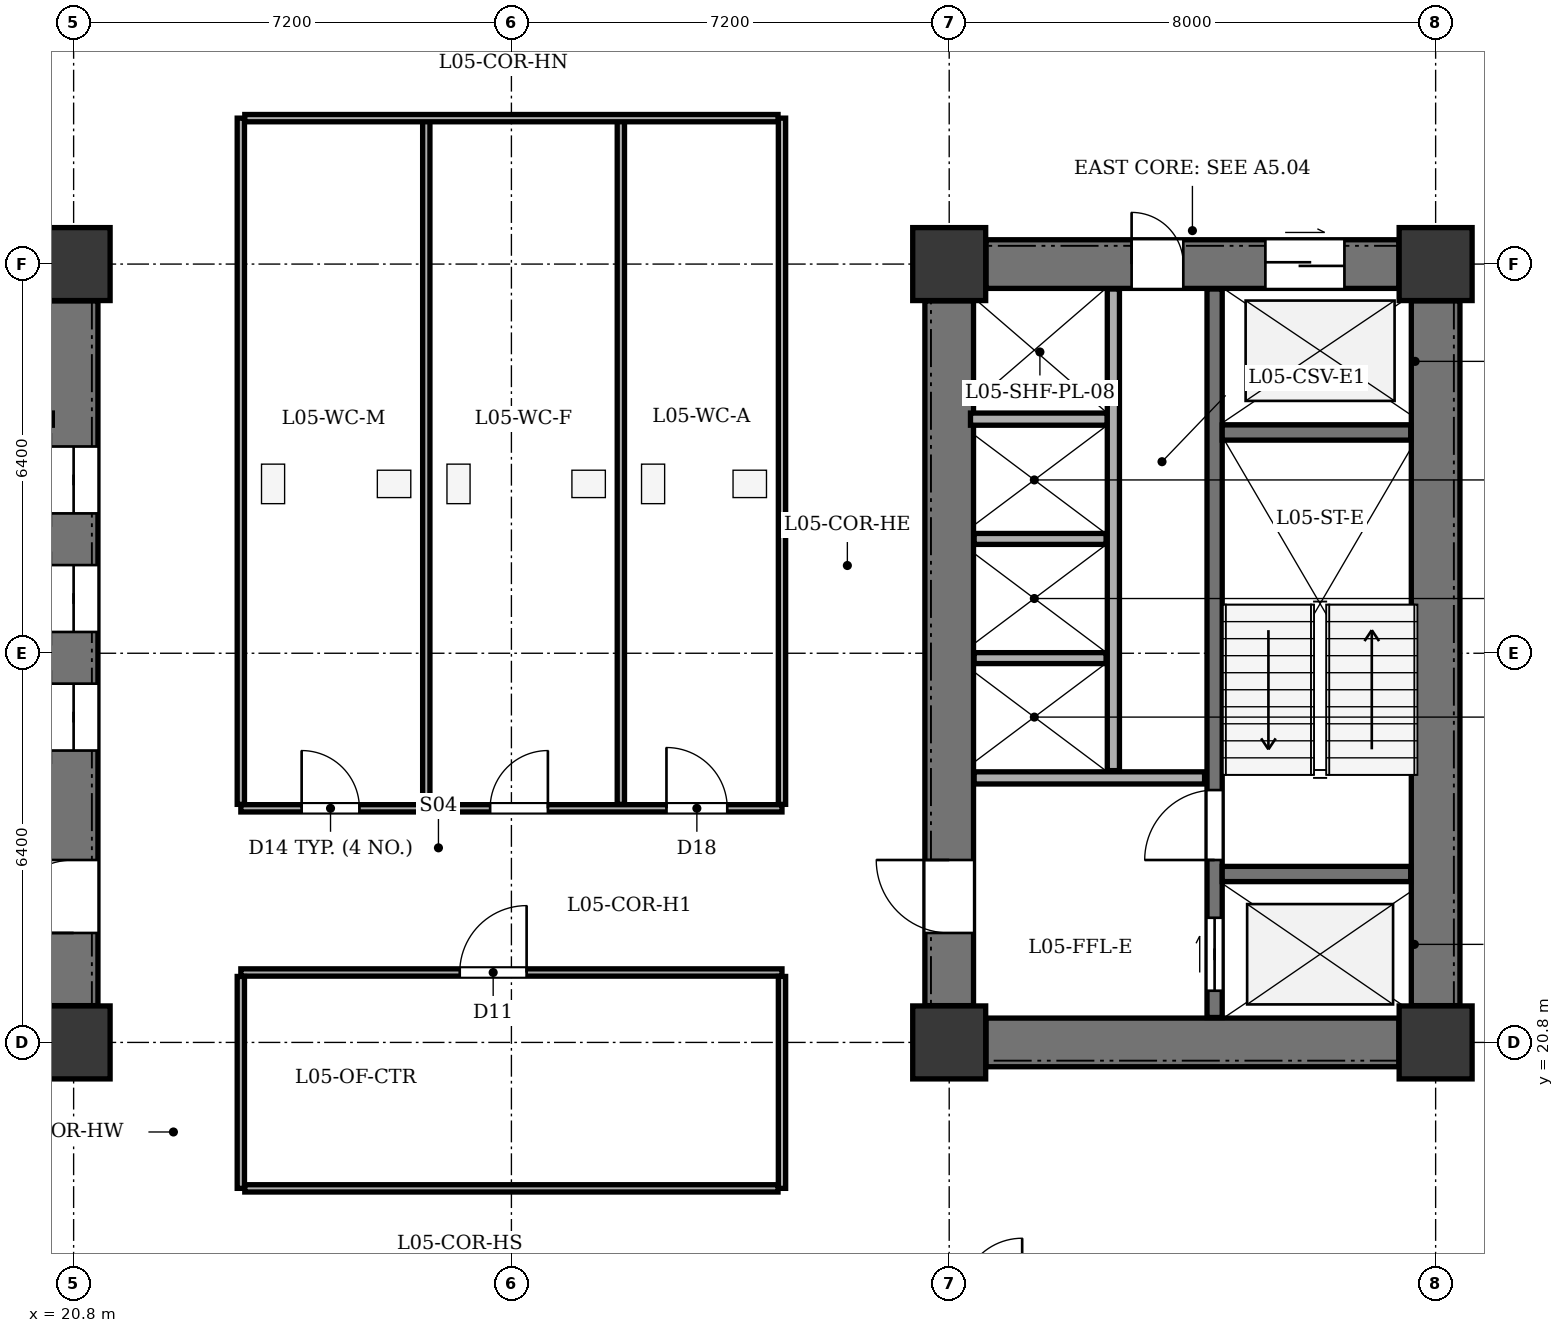
"""IFC4 building model, lengths in metres.
Left out: names, types, materials, properties, quantities, classifications, styles, units other than length and angle.
Written with IfcOpenShell. Run it as: python <this file> out.ifc"""

import sys

from ifc_helpers import new_model, si_unit, direction, frame, frame_2d, origin, origin_2d, place, context, subcontext, project, spatial, rectangle, extrude, element, fill, save


model = new_model("IFC4")
c1 = context("Model", 3, precision=1e-05, world=origin(), true_north=direction((0.0, 1.0)))
c2 = subcontext(c1, "Body", "Model", "MODEL_VIEW")
j1 = project(units=[si_unit("LENGTHUNIT", "METRE"), si_unit("PLANEANGLEUNIT", "RADIAN")], contexts=[c1])
p1 = place(None, origin())
s1 = spatial("IfcSite", under=j1, at=p1, CompositionType="ELEMENT")
p2 = place(p1, origin())
s2 = spatial("IfcBuilding", under=s1, at=p2, CompositionType="ELEMENT")
p3 = place(p2, frame((0.0, 0.0, 24.3)))
s3 = spatial("IfcBuildingStorey", under=s2, at=p3, CompositionType="ELEMENT", Elevation=24.3)
for number, where, z_axis, x_axis in (
    (1, (20.8, 20.8, 0.0), (0.0, 0.0, 1.0), (1.0, 0.0, 0.0)),
    (2, (20.8, 33.6, 0.0), (0.0, 0.0, 1.0), (1.0, 0.0, 0.0)),
    (3, (35.2, 20.8, 0.0), (0.0, 0.0, 1.0), (1.0, 0.0, 0.0)),
    (4, (43.2, 20.8, 0.0), (0.0, 0.0, 1.0), (1.0, 0.0, 0.0)),
    (5, (35.2, 33.6, 0.0), (0.0, 0.0, 1.0), (1.0, 0.0, 0.0)),
    (6, (43.2, 33.6, 0.0), (0.0, 0.0, 1.0), (1.0, 0.0, 0.0)),
):
    element("IfcColumn", number, at=place(p3, frame(where, z_axis=z_axis, x_axis=x_axis)), inside=s3, PredefinedType="COLUMN", context=c2, shape_type="SweptSolid", body=[
        extrude(rectangle(XDim=1.2, YDim=1.2, at=origin_2d()), origin(), (0.0, 0.0, 1.0), 3.9),
    ])
p4 = place(p3, frame((20.8, 21.405, 0.0), z_axis=(0.0, 0.0, 1.0), x_axis=(0.0, 1.0, 0.0)))
e7 = element("IfcWall", 7, at=p4, inside=s3, PredefinedType="SHEAR", context=c2, shape_type="SweptSolid", body=[
    extrude(rectangle(XDim=11.59, YDim=0.8, at=frame_2d((5.795, 0.0))), origin(), (0.0, 0.0, 1.0), 3.6),
])
p5 = place(p4, frame((1.195, 0.0, 0.0)))
e8 = element("IfcOpeningElement", 8, at=p5, cuts=e7, PredefinedType="OPENING", context=c2, shape_type="SweptSolid", body=[
    extrude(rectangle(XDim=1.2, YDim=2.15, at=frame_2d((0.6, 1.075))), frame((0.0, 0.41, 0.0), z_axis=(0.0, -1.0, 0.0), x_axis=(1.0, 0.0, 0.0)), (0.0, 0.0, 1.0), 0.82),
])
p6 = place(p4, frame((4.195, 0.0, 0.0)))
e9 = element("IfcOpeningElement", 9, at=p6, cuts=e7, PredefinedType="OPENING", context=c2, shape_type="SweptSolid", body=[
    extrude(rectangle(XDim=1.1, YDim=2.1, at=frame_2d((0.55, 1.05))), frame((0.0, 0.41, 0.0), z_axis=(0.0, -1.0, 0.0), x_axis=(1.0, 0.0, 0.0)), (0.0, 0.0, 1.0), 0.82),
])
p7 = place(p4, frame((6.145, 0.0, 0.0)))
e10 = element("IfcOpeningElement", 10, at=p7, cuts=e7, PredefinedType="OPENING", context=c2, shape_type="SweptSolid", body=[
    extrude(rectangle(XDim=1.1, YDim=2.1, at=frame_2d((0.55, 1.05))), frame((0.0, 0.41, 0.0), z_axis=(0.0, -1.0, 0.0), x_axis=(1.0, 0.0, 0.0)), (0.0, 0.0, 1.0), 0.82),
])
p8 = place(p4, frame((8.095, 0.0, 0.0)))
e11 = element("IfcOpeningElement", 11, at=p8, cuts=e7, PredefinedType="OPENING", context=c2, shape_type="SweptSolid", body=[
    extrude(rectangle(XDim=1.1, YDim=2.1, at=frame_2d((0.55, 1.05))), frame((0.0, 0.41, 0.0), z_axis=(0.0, -1.0, 0.0), x_axis=(1.0, 0.0, 0.0)), (0.0, 0.0, 1.0), 0.82),
])
p9 = place(p3, frame((43.2, 21.405, 0.0), z_axis=(0.0, 0.0, 1.0), x_axis=(0.0, 1.0, 0.0)))
e12 = element("IfcWall", 12, at=p9, inside=s3, PredefinedType="SHEAR", context=c2, shape_type="SweptSolid", body=[
    extrude(rectangle(XDim=11.59, YDim=0.8, at=frame_2d((5.795, 0.0))), origin(), (0.0, 0.0, 1.0), 3.6),
])
p10 = place(p3, frame((35.805, 20.8, 0.0), z_axis=(0.0, 0.0, 1.0), x_axis=(1.0, 0.0, 0.0)))
e13 = element("IfcWall", 13, at=p10, inside=s3, PredefinedType="SHEAR", context=c2, shape_type="SweptSolid", body=[
    extrude(rectangle(XDim=6.79, YDim=0.8, at=frame_2d((3.395, 0.0))), origin(), (0.0, 0.0, 1.0), 3.6),
])
p11 = place(p3, frame((35.805, 33.6, 0.0), z_axis=(0.0, 0.0, 1.0), x_axis=(1.0, 0.0, 0.0)))
e14 = element("IfcWall", 14, at=p11, inside=s3, PredefinedType="SHEAR", context=c2, shape_type="SweptSolid", body=[
    extrude(rectangle(XDim=6.79, YDim=0.8, at=frame_2d((3.395, 0.0))), origin(), (0.0, 0.0, 1.0), 3.6),
])
p12 = place(p11, frame((4.595, 0.0, 0.0)))
e15 = element("IfcOpeningElement", 15, at=p12, cuts=e14, PredefinedType="OPENING", context=c2, shape_type="SweptSolid", body=[
    extrude(rectangle(XDim=1.3, YDim=2.15, at=frame_2d((0.65, 1.075))), frame((0.0, 0.41, 0.0), z_axis=(0.0, -1.0, 0.0), x_axis=(1.0, 0.0, 0.0)), (0.0, 0.0, 1.0), 0.82),
])
p13 = place(p11, frame((2.395, 0.0, 0.0)))
e16 = element("IfcOpeningElement", 16, at=p13, cuts=e14, PredefinedType="OPENING", context=c2, shape_type="SweptSolid", body=[
    extrude(rectangle(XDim=0.85, YDim=2.02, at=frame_2d((0.425, 1.01))), frame((0.0, 0.41, 0.0), z_axis=(0.0, -1.0, 0.0), x_axis=(1.0, 0.0, 0.0)), (0.0, 0.0, 1.0), 0.82),
])
p14 = place(p3, frame((35.2, 21.405, 0.0), z_axis=(0.0, 0.0, 1.0), x_axis=(0.0, 1.0, 0.0)))
e17 = element("IfcWall", 17, at=p14, inside=s3, PredefinedType="SHEAR", context=c2, shape_type="SweptSolid", body=[
    extrude(rectangle(XDim=11.59, YDim=0.8, at=frame_2d((5.795, 0.0))), origin(), (0.0, 0.0, 1.0), 3.6),
])
p15 = place(p14, frame((1.195, 0.0, 0.0)))
e18 = element("IfcOpeningElement", 18, at=p15, cuts=e17, PredefinedType="OPENING", context=c2, shape_type="SweptSolid", body=[
    extrude(rectangle(XDim=1.2, YDim=2.15, at=frame_2d((0.6, 1.075))), frame((0.0, 0.41, 0.0), z_axis=(0.0, -1.0, 0.0), x_axis=(1.0, 0.0, 0.0)), (0.0, 0.0, 1.0), 0.82),
])
p16 = place(p3, frame((39.565, 21.21, 0.0), z_axis=(0.0, 0.0, 1.0), x_axis=(0.0, 1.0, 0.0)))
e19 = element("IfcWall", 19, at=p16, inside=s3, PredefinedType="SHEAR", context=c2, shape_type="SweptSolid", body=[
    extrude(rectangle(XDim=11.98, YDim=0.25, at=frame_2d((5.99, 0.0))), origin(), (0.0, 0.0, 1.0), 3.6),
])
p17 = place(p16, frame((0.44, 0.0, 0.0)))
e20 = element("IfcOpeningElement", 20, at=p17, cuts=e19, PredefinedType="OPENING", context=c2, shape_type="SweptSolid", body=[
    extrude(rectangle(XDim=1.2, YDim=2.15, at=frame_2d((0.6, 1.075))), frame((0.0, 0.135, 0.0), z_axis=(0.0, -1.0, 0.0), x_axis=(1.0, 0.0, 0.0)), (0.0, 0.0, 1.0), 0.27),
])
p18 = place(p16, frame((2.59, 0.0, 0.0)))
e21 = element("IfcOpeningElement", 21, at=p18, cuts=e19, PredefinedType="OPENING", context=c2, shape_type="SweptSolid", body=[
    extrude(rectangle(XDim=1.15, YDim=2.15, at=frame_2d((0.575, 1.075))), frame((0.0, 0.135, 0.0), z_axis=(0.0, -1.0, 0.0), x_axis=(1.0, 0.0, 0.0)), (0.0, 0.0, 1.0), 0.27),
])
for number, where, z_axis, x_axis in (
    (22, (39.69, 23.57, 0.0), (0.0, 0.0, 1.0), (1.0, 0.0, 0.0)),
    (23, (39.69, 30.83, 0.0), (0.0, 0.0, 1.0), (1.0, 0.0, 0.0)),
):
    element("IfcWall", number, at=place(p3, frame(where, z_axis=z_axis, x_axis=x_axis)), inside=s3, PredefinedType="SHEAR", context=c2, shape_type="SweptSolid", body=[
        extrude(rectangle(XDim=3.1, YDim=0.25, at=frame_2d((1.55, 0.0))), origin(), (0.0, 0.0, 1.0), 3.6),
    ])
p19 = place(p3, frame((35.61, 25.15, 0.0), z_axis=(0.0, 0.0, 1.0), x_axis=(1.0, 0.0, 0.0)))
e24 = element("IfcWall", 24, at=p19, inside=s3, PredefinedType="SOLIDWALL", context=c2, shape_type="SweptSolid", body=[
    extrude(rectangle(XDim=3.79, YDim=0.2, at=frame_2d((1.895, 0.0))), origin(), (0.0, 0.0, 1.0), 3.6),
])
p20 = place(p3, frame((35.55, 31.05, 0.0), z_axis=(0.0, 0.0, 1.0), x_axis=(1.0, 0.0, 0.0)))
e25 = element("IfcWall", 25, at=p20, inside=s3, PredefinedType="SOLIDWALL", context=c2, shape_type="SweptSolid", body=[
    extrude(rectangle(XDim=2.25, YDim=0.2, at=frame_2d((1.125, 0.0))), origin(), (0.0, 0.0, 1.0), 3.6),
])
p21 = place(p3, frame((37.9, 25.27, 0.0), z_axis=(0.0, 0.0, 1.0), x_axis=(0.0, 1.0, 0.0)))
e26 = element("IfcWall", 26, at=p21, inside=s3, PredefinedType="SOLIDWALL", context=c2, shape_type="SweptSolid", body=[
    extrude(rectangle(XDim=7.92, YDim=0.2, at=frame_2d((3.96, 0.0))), origin(), (0.0, 0.0, 1.0), 3.6),
])
for number, where, z_axis, x_axis in (
    (27, (35.61, 27.12, 0.0), (0.0, 0.0, 1.0), (1.0, 0.0, 0.0)),
    (28, (35.61, 29.08, 0.0), (0.0, 0.0, 1.0), (1.0, 0.0, 0.0)),
):
    element("IfcWall", number, at=place(p3, frame(where, z_axis=z_axis, x_axis=x_axis)), inside=s3, PredefinedType="PARTITIONING", context=c2, shape_type="SweptSolid", body=[
        extrude(rectangle(XDim=2.17, YDim=0.18, at=frame_2d((1.085, 0.0))), origin(), (0.0, 0.0, 1.0), 3.6),
    ])
p22 = place(p3, frame((23.55, 24.65, 0.0), z_axis=(0.0, 0.0, 1.0), x_axis=(1.0, 0.0, 0.0)))
e29 = element("IfcWall", 29, at=p22, inside=s3, PredefinedType="PARTITIONING", context=c2, shape_type="SweptSolid", body=[
    extrude(rectangle(XDim=8.9, YDim=0.12, at=frame_2d((4.45, 0.0))), origin(), (0.0, 0.0, 1.0), 3.135),
])
p23 = place(p22, frame((1.0, 0.0, 0.0)))
e30 = element("IfcOpeningElement", 30, at=p23, cuts=e29, PredefinedType="OPENING", context=c2, shape_type="SweptSolid", body=[
    extrude(rectangle(XDim=0.95, YDim=2.1, at=frame_2d((0.475, 1.05))), frame((0.0, 0.07, 0.0), z_axis=(0.0, -1.0, 0.0), x_axis=(1.0, 0.0, 0.0)), (0.0, 0.0, 1.0), 0.14),
])
p24 = place(p22, frame((4.1, 0.0, 0.0)))
e31 = element("IfcOpeningElement", 31, at=p24, cuts=e29, PredefinedType="OPENING", context=c2, shape_type="SweptSolid", body=[
    extrude(rectangle(XDim=0.95, YDim=2.1, at=frame_2d((0.475, 1.05))), frame((0.0, 0.07, 0.0), z_axis=(0.0, -1.0, 0.0), x_axis=(1.0, 0.0, 0.0)), (0.0, 0.0, 1.0), 0.14),
])
p25 = place(p22, frame((7.0, 0.0, 0.0)))
e32 = element("IfcOpeningElement", 32, at=p25, cuts=e29, PredefinedType="OPENING", context=c2, shape_type="SweptSolid", body=[
    extrude(rectangle(XDim=1.0, YDim=2.1, at=frame_2d((0.5, 1.05))), frame((0.0, 0.07, 0.0), z_axis=(0.0, -1.0, 0.0), x_axis=(1.0, 0.0, 0.0)), (0.0, 0.0, 1.0), 0.14),
])
for number, where, z_axis, x_axis in (
    (33, (23.55, 24.715, 0.0), (0.0, 0.0, 1.0), (0.0, 1.0, 0.0)),
    (34, (32.45, 24.715, 0.0), (0.0, 0.0, 1.0), (0.0, 1.0, 0.0)),
    (35, (26.6, 24.715, 0.0), (0.0, 0.0, 1.0), (0.0, 1.0, 0.0)),
):
    element("IfcWall", number, at=place(p3, frame(where, z_axis=z_axis, x_axis=x_axis)), inside=s3, PredefinedType="PARTITIONING", context=c2, shape_type="SweptSolid", body=[
        extrude(rectangle(XDim=11.285, YDim=0.12, at=frame_2d((5.643, 0.0))), origin(), (0.0, 0.0, 1.0), 3.6),
    ])
p26 = place(p3, frame((29.8, 24.715, 0.0), z_axis=(0.0, 0.0, 1.0), x_axis=(0.0, 1.0, 0.0)))
e36 = element("IfcWall", 36, at=p26, inside=s3, PredefinedType="PARTITIONING", context=c2, shape_type="SweptSolid", body=[
    extrude(rectangle(XDim=11.285, YDim=0.12, at=frame_2d((5.643, 0.0))), origin(), (0.0, 0.0, 1.0), 3.135),
])
p27 = place(p3, frame((23.615, 36.0, 0.0), z_axis=(0.0, 0.0, 1.0), x_axis=(1.0, 0.0, 0.0)))
e37 = element("IfcWall", 37, at=p27, inside=s3, PredefinedType="PARTITIONING", context=c2, shape_type="SweptSolid", body=[
    extrude(rectangle(XDim=8.77, YDim=0.12, at=frame_2d((4.385, 0.0))), origin(), (0.0, 0.0, 1.0), 3.6),
])
p28 = place(p3, frame((23.55, 21.95, 0.0), z_axis=(0.0, 0.0, 1.0), x_axis=(1.0, 0.0, 0.0)))
e38 = element("IfcWall", 38, at=p28, inside=s3, PredefinedType="PARTITIONING", context=c2, shape_type="SweptSolid", body=[
    extrude(rectangle(XDim=8.9, YDim=0.12, at=frame_2d((4.45, 0.0))), origin(), (0.0, 0.0, 1.0), 3.135),
])
p29 = place(p28, frame((3.6, 0.0, 0.0)))
e39 = element("IfcOpeningElement", 39, at=p29, cuts=e38, PredefinedType="OPENING", context=c2, shape_type="SweptSolid", body=[
    extrude(rectangle(XDim=1.1, YDim=2.15, at=frame_2d((0.55, 1.075))), frame((0.0, 0.07, 0.0), z_axis=(0.0, -1.0, 0.0), x_axis=(1.0, 0.0, 0.0)), (0.0, 0.0, 1.0), 0.14),
])
for number, where, z_axis, x_axis in (
    (40, (23.55, 18.4, 0.0), (0.0, 0.0, 1.0), (0.0, 1.0, 0.0)),
    (41, (32.45, 18.4, 0.0), (0.0, 0.0, 1.0), (0.0, 1.0, 0.0)),
):
    element("IfcWall", number, at=place(p3, frame(where, z_axis=z_axis, x_axis=x_axis)), inside=s3, PredefinedType="PARTITIONING", context=c2, shape_type="SweptSolid", body=[
        extrude(rectangle(XDim=3.485, YDim=0.12, at=frame_2d((1.743, 0.0))), origin(), (0.0, 0.0, 1.0), 3.6),
    ])
p30 = place(p3, frame((23.615, 18.4, 0.0), z_axis=(0.0, 0.0, 1.0), x_axis=(1.0, 0.0, 0.0)))
e42 = element("IfcWall", 42, at=p30, inside=s3, PredefinedType="PARTITIONING", context=c2, shape_type="SweptSolid", body=[
    extrude(rectangle(XDim=8.77, YDim=0.12, at=frame_2d((4.385, 0.0))), origin(), (0.0, 0.0, 1.0), 3.6),
])
p31 = place(p5, origin())
e43 = element("IfcDoor", 43, at=p31, inside=s3, OperationType="SINGLE_SWING_LEFT", PredefinedType="DOOR", context=c2, shape_type="SweptSolid", body=[
    extrude(rectangle(XDim=1.2, YDim=2.15, at=frame_2d((0.6, 1.075))), frame((0.0, 0.025, 0.0), z_axis=(0.0, -1.0, 0.0), x_axis=(1.0, 0.0, 0.0)), (0.0, 0.0, 1.0), 0.05),
])
fill(e8, e43)
p32 = place(p6, origin())
e44 = element("IfcDoor", 44, at=p32, inside=s3, OperationType="DOUBLE_DOOR_SLIDING", PredefinedType="DOOR", context=c2, shape_type="SweptSolid", body=[
    extrude(rectangle(XDim=1.1, YDim=2.1, at=frame_2d((0.55, 1.05))), frame((0.0, 0.025, 0.0), z_axis=(0.0, -1.0, 0.0), x_axis=(1.0, 0.0, 0.0)), (0.0, 0.0, 1.0), 0.05),
])
fill(e9, e44)
p33 = place(p7, origin())
e45 = element("IfcDoor", 45, at=p33, inside=s3, OperationType="DOUBLE_DOOR_SLIDING", PredefinedType="DOOR", context=c2, shape_type="SweptSolid", body=[
    extrude(rectangle(XDim=1.1, YDim=2.1, at=frame_2d((0.55, 1.05))), frame((0.0, 0.025, 0.0), z_axis=(0.0, -1.0, 0.0), x_axis=(1.0, 0.0, 0.0)), (0.0, 0.0, 1.0), 0.05),
])
fill(e10, e45)
p34 = place(p8, origin())
e46 = element("IfcDoor", 46, at=p34, inside=s3, OperationType="DOUBLE_DOOR_SLIDING", PredefinedType="DOOR", context=c2, shape_type="SweptSolid", body=[
    extrude(rectangle(XDim=1.1, YDim=2.1, at=frame_2d((0.55, 1.05))), frame((0.0, 0.025, 0.0), z_axis=(0.0, -1.0, 0.0), x_axis=(1.0, 0.0, 0.0)), (0.0, 0.0, 1.0), 0.05),
])
fill(e11, e46)
p35 = place(p12, origin())
e47 = element("IfcDoor", 47, at=p35, inside=s3, OperationType="DOUBLE_DOOR_SLIDING", PredefinedType="DOOR", context=c2, shape_type="SweptSolid", body=[
    extrude(rectangle(XDim=1.3, YDim=2.15, at=frame_2d((0.65, 1.075))), frame((0.0, 0.025, 0.0), z_axis=(0.0, -1.0, 0.0), x_axis=(1.0, 0.0, 0.0)), (0.0, 0.0, 1.0), 0.05),
])
fill(e15, e47)
p36 = place(p13, origin())
e48 = element("IfcDoor", 48, at=p36, inside=s3, OperationType="SINGLE_SWING_LEFT", PredefinedType="DOOR", context=c2, shape_type="SweptSolid", body=[
    extrude(rectangle(XDim=0.85, YDim=2.02, at=frame_2d((0.425, 1.01))), frame((0.0, 0.025, 0.0), z_axis=(0.0, -1.0, 0.0), x_axis=(1.0, 0.0, 0.0)), (0.0, 0.0, 1.0), 0.05),
])
fill(e16, e48)
p37 = place(p15, origin())
e49 = element("IfcDoor", 49, at=p37, inside=s3, OperationType="SINGLE_SWING_RIGHT", PredefinedType="DOOR", context=c2, shape_type="SweptSolid", body=[
    extrude(rectangle(XDim=1.2, YDim=2.15, at=frame_2d((0.6, 1.075))), frame((0.0, 0.025, 0.0), z_axis=(0.0, -1.0, 0.0), x_axis=(1.0, 0.0, 0.0)), (0.0, 0.0, 1.0), 0.05),
])
fill(e18, e49)
p38 = place(p17, origin())
e50 = element("IfcDoor", 50, at=p38, inside=s3, OperationType="DOUBLE_DOOR_SLIDING", PredefinedType="DOOR", context=c2, shape_type="SweptSolid", body=[
    extrude(rectangle(XDim=1.2, YDim=2.15, at=frame_2d((0.6, 1.075))), frame((0.0, 0.025, 0.0), z_axis=(0.0, -1.0, 0.0), x_axis=(1.0, 0.0, 0.0)), (0.0, 0.0, 1.0), 0.05),
])
fill(e20, e50)
p39 = place(p18, origin())
e51 = element("IfcDoor", 51, at=p39, inside=s3, OperationType="SINGLE_SWING_LEFT", PredefinedType="DOOR", context=c2, shape_type="SweptSolid", body=[
    extrude(rectangle(XDim=1.15, YDim=2.15, at=frame_2d((0.575, 1.075))), frame((0.0, 0.025, 0.0), z_axis=(0.0, -1.0, 0.0), x_axis=(1.0, 0.0, 0.0)), (0.0, 0.0, 1.0), 0.05),
])
fill(e21, e51)
p40 = place(p23, origin())
e52 = element("IfcDoor", 52, at=p40, inside=s3, OperationType="SINGLE_SWING_LEFT", PredefinedType="DOOR", context=c2, shape_type="SweptSolid", body=[
    extrude(rectangle(XDim=0.95, YDim=2.1, at=frame_2d((0.475, 1.05))), frame((0.0, 0.025, 0.0), z_axis=(0.0, -1.0, 0.0), x_axis=(1.0, 0.0, 0.0)), (0.0, 0.0, 1.0), 0.05),
])
fill(e30, e52)
p41 = place(p24, origin())
e53 = element("IfcDoor", 53, at=p41, inside=s3, OperationType="SINGLE_SWING_RIGHT", PredefinedType="DOOR", context=c2, shape_type="SweptSolid", body=[
    extrude(rectangle(XDim=0.95, YDim=2.1, at=frame_2d((0.475, 1.05))), frame((0.0, 0.025, 0.0), z_axis=(0.0, -1.0, 0.0), x_axis=(1.0, 0.0, 0.0)), (0.0, 0.0, 1.0), 0.05),
])
fill(e31, e53)
p42 = place(p25, origin())
e54 = element("IfcDoor", 54, at=p42, inside=s3, OperationType="SINGLE_SWING_LEFT", PredefinedType="DOOR", context=c2, shape_type="SweptSolid", body=[
    extrude(rectangle(XDim=1.0, YDim=2.1, at=frame_2d((0.5, 1.05))), frame((0.0, 0.025, 0.0), z_axis=(0.0, -1.0, 0.0), x_axis=(1.0, 0.0, 0.0)), (0.0, 0.0, 1.0), 0.05),
])
fill(e32, e54)
p43 = place(p29, origin())
e55 = element("IfcDoor", 55, at=p43, inside=s3, OperationType="SINGLE_SWING_RIGHT", PredefinedType="DOOR", context=c2, shape_type="SweptSolid", body=[
    extrude(rectangle(XDim=1.1, YDim=2.15, at=frame_2d((0.55, 1.075))), frame((0.0, 0.025, 0.0), z_axis=(0.0, -1.0, 0.0), x_axis=(1.0, 0.0, 0.0)), (0.0, 0.0, 1.0), 0.05),
])
fill(e39, e55)
save(model, sys.argv[1])
